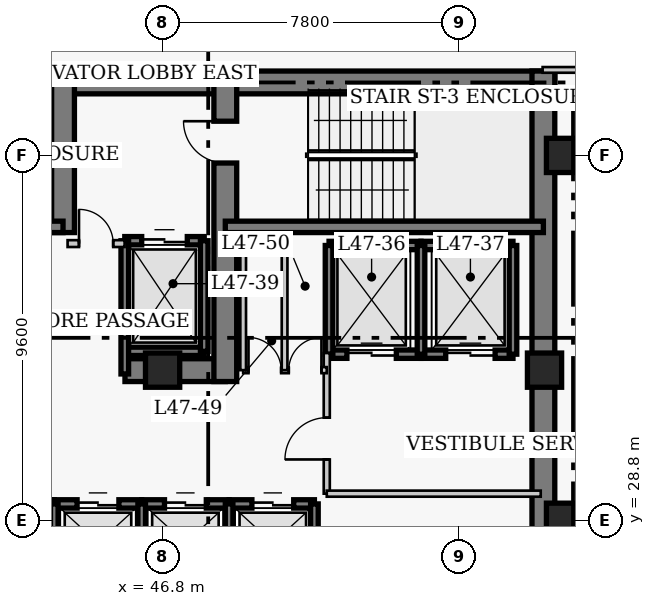
"""IFC4 building model, lengths in metres.
Left out: names, types, materials, properties, quantities, classifications, styles, units other than length and angle.
Written with IfcOpenShell. Run it as: python <this file> out.ifc"""

import sys

from ifc_helpers import new_model, si_unit, direction, frame, frame_2d, origin, origin_2d, place, context, subcontext, project, spatial, rectangle, extrude, element, fill, save


model = new_model("IFC4")
c1 = context("Model", 3, precision=1e-05, world=origin(), true_north=direction((0.0, 1.0)))
c2 = subcontext(c1, "Body", "Model", "MODEL_VIEW")
j1 = project(units=[si_unit("LENGTHUNIT", "METRE"), si_unit("PLANEANGLEUNIT", "RADIAN")], contexts=[c1])
p1 = place(None, origin())
s1 = spatial("IfcSite", under=j1, at=p1, CompositionType="ELEMENT")
p2 = place(p1, origin())
s2 = spatial("IfcBuilding", under=s1, at=p2, CompositionType="ELEMENT")
p3 = place(p2, frame((0.0, 0.0, 189.0)))
s3 = spatial("IfcBuildingStorey", under=s2, at=p3, CompositionType="ELEMENT", Elevation=189.0)
p4 = place(p3, frame((35.85, 40.32, 0.0), z_axis=(0.0, 0.0, 1.0), x_axis=(1.0, 0.0, 0.0)))
e1 = element("IfcWall", 1, at=p4, inside=s3, PredefinedType="SHEAR", context=c2, shape_type="SweptSolid", body=[
    extrude(rectangle(XDim=12.6, YDim=0.6, at=frame_2d((6.3, 0.0))), origin(), (0.0, 0.0, 1.0), 3.9),
])
p5 = place(p3, frame((48.45, 40.32, 0.0), z_axis=(0.0, 0.0, 1.0), x_axis=(1.0, 0.0, 0.0)))
e2 = element("IfcWall", 2, at=p5, inside=s3, PredefinedType="SHEAR", context=c2, shape_type="SweptSolid", body=[
    extrude(rectangle(XDim=8.67, YDim=0.6, at=frame_2d((4.335, 0.0))), origin(), (0.0, 0.0, 1.0), 3.9),
])
p6 = place(p3, frame((56.82, 27.05, 0.0), z_axis=(0.0, 0.0, 1.0), x_axis=(0.0, 1.0, 0.0)))
e3 = element("IfcWall", 3, at=p6, inside=s3, PredefinedType="SHEAR", context=c2, shape_type="SweptSolid", body=[
    extrude(rectangle(XDim=13.57, YDim=0.6, at=frame_2d((6.785, 0.0))), origin(), (0.0, 0.0, 1.0), 3.9),
])
p7 = place(p3, frame((45.81, 32.75, 0.0), z_axis=(0.0, 0.0, 1.0), x_axis=(1.0, 0.0, 0.0)))
e4 = element("IfcWall", 4, at=p7, inside=s3, PredefinedType="SHEAR", context=c2, shape_type="SweptSolid", body=[
    extrude(rectangle(XDim=2.64, YDim=0.6, at=frame_2d((1.32, 0.0))), origin(), (0.0, 0.0, 1.0), 3.9),
])
p8 = place(p3, frame((44.18, 36.37, 0.0), z_axis=(0.0, 0.0, 1.0), x_axis=(0.0, 1.0, 0.0)))
e5 = element("IfcWall", 5, at=p8, inside=s3, PredefinedType="SHEAR", context=c2, shape_type="SweptSolid", body=[
    extrude(rectangle(XDim=3.95, YDim=0.6, at=frame_2d((1.975, 0.0))), origin(), (0.0, 0.0, 1.0), 3.9),
])
p9 = place(p3, frame((48.45, 32.45, 0.0), z_axis=(0.0, 0.0, 1.0), x_axis=(0.0, 1.0, 0.0)))
e6 = element("IfcWall", 6, at=p9, inside=s3, PredefinedType="SHEAR", context=c2, shape_type="SweptSolid", body=[
    extrude(rectangle(XDim=7.87, YDim=0.6, at=frame_2d((3.935, 0.0))), origin(), (0.0, 0.0, 1.0), 3.9),
])
p10 = place(p9, frame((5.75, 0.0, 0.0)))
e7 = element("IfcOpeningElement", 7, at=p10, cuts=e6, PredefinedType="OPENING", context=c2, shape_type="SweptSolid", body=[
    extrude(rectangle(XDim=1.1, YDim=2.15, at=frame_2d((0.55, 1.075))), frame((0.0, 0.31, 0.0), z_axis=(0.0, -1.0, 0.0), x_axis=(1.0, 0.0, 0.0)), (0.0, 0.0, 1.0), 0.62),
])
p11 = place(p3, frame((35.85, 36.52, 0.0), z_axis=(0.0, 0.0, 1.0), x_axis=(1.0, 0.0, 0.0)))
e8 = element("IfcWall", 8, at=p11, inside=s3, PredefinedType="SHEAR", context=c2, shape_type="SweptSolid", body=[
    extrude(rectangle(XDim=8.33, YDim=0.3, at=frame_2d((4.165, 0.0))), origin(), (0.0, 0.0, 1.0), 3.9),
])
p12 = place(p3, frame((48.45, 36.52, 0.0), z_axis=(0.0, 0.0, 1.0), x_axis=(1.0, 0.0, 0.0)))
e9 = element("IfcWall", 9, at=p12, inside=s3, PredefinedType="SHEAR", context=c2, shape_type="SweptSolid", body=[
    extrude(rectangle(XDim=8.37, YDim=0.3, at=frame_2d((4.185, 0.0))), origin(), (0.0, 0.0, 1.0), 3.9),
])
for number, where, z_axis, x_axis in (
    (10, (57.35, 28.8, 0.0), (0.0, 0.0, 1.0), (1.0, 0.0, 0.0)),
    (11, (57.35, 38.4, 0.0), (0.0, 0.0, 1.0), (1.0, 0.0, 0.0)),
    (12, (46.8, 32.75, 0.0), (0.0, 0.0, 1.0), (1.0, 0.0, 0.0)),
    (13, (56.85, 32.75, 0.0), (0.0, 0.0, 1.0), (1.0, 0.0, 0.0)),
):
    element("IfcColumn", number, at=place(p3, frame(where, z_axis=z_axis, x_axis=x_axis)), inside=s3, PredefinedType="COLUMN", context=c2, shape_type="SweptSolid", body=[
        extrude(rectangle(XDim=0.9, YDim=0.9, at=origin_2d()), origin(), (0.0, 0.0, 1.0), 3.9),
    ])
p13 = place(p3, frame((41.705, 29.23, 0.0), z_axis=(0.0, 0.0, 1.0), x_axis=(1.0, 0.0, 0.0)))
e14 = element("IfcWall", 14, at=p13, inside=s3, PredefinedType="SHEAR", context=c2, shape_type="SweptSolid", body=[
    extrude(rectangle(XDim=2.245, YDim=0.22, at=frame_2d((1.123, 0.0))), origin(), (0.0, 0.0, 1.0), 3.9),
])
p14 = place(p13, frame((0.545, 0.0, 0.0)))
e15 = element("IfcOpeningElement", 15, at=p14, cuts=e14, PredefinedType="OPENING", context=c2, shape_type="SweptSolid", body=[
    extrude(rectangle(XDim=1.1, YDim=2.15, at=frame_2d((0.55, 1.075))), frame((0.0, 0.12, 0.0), z_axis=(0.0, -1.0, 0.0), x_axis=(1.0, 0.0, 0.0)), (0.0, 0.0, 1.0), 0.24),
])
p15 = place(p3, frame((43.95, 29.23, 0.0), z_axis=(0.0, 0.0, 1.0), x_axis=(1.0, 0.0, 0.0)))
e16 = element("IfcWall", 16, at=p15, inside=s3, PredefinedType="SHEAR", context=c2, shape_type="SweptSolid", body=[
    extrude(rectangle(XDim=2.3, YDim=0.22, at=frame_2d((1.15, 0.0))), origin(), (0.0, 0.0, 1.0), 3.9),
])
p16 = place(p15, frame((0.6, 0.0, 0.0)))
e17 = element("IfcOpeningElement", 17, at=p16, cuts=e16, PredefinedType="OPENING", context=c2, shape_type="SweptSolid", body=[
    extrude(rectangle(XDim=1.1, YDim=2.15, at=frame_2d((0.55, 1.075))), frame((0.0, 0.12, 0.0), z_axis=(0.0, -1.0, 0.0), x_axis=(1.0, 0.0, 0.0)), (0.0, 0.0, 1.0), 0.24),
])
p17 = place(p3, frame((43.95, 27.17, 0.0), z_axis=(0.0, 0.0, 1.0), x_axis=(0.0, 1.0, 0.0)))
e18 = element("IfcWall", 18, at=p17, inside=s3, PredefinedType="SHEAR", context=c2, shape_type="SweptSolid", body=[
    extrude(rectangle(XDim=2.06, YDim=0.2, at=frame_2d((1.03, 0.0))), origin(), (0.0, 0.0, 1.0), 3.9),
])
p18 = place(p3, frame((46.25, 29.23, 0.0), z_axis=(0.0, 0.0, 1.0), x_axis=(1.0, 0.0, 0.0)))
e19 = element("IfcWall", 19, at=p18, inside=s3, PredefinedType="SHEAR", context=c2, shape_type="SweptSolid", body=[
    extrude(rectangle(XDim=2.3, YDim=0.22, at=frame_2d((1.15, 0.0))), origin(), (0.0, 0.0, 1.0), 3.9),
])
p19 = place(p18, frame((0.6, 0.0, 0.0)))
e20 = element("IfcOpeningElement", 20, at=p19, cuts=e19, PredefinedType="OPENING", context=c2, shape_type="SweptSolid", body=[
    extrude(rectangle(XDim=1.1, YDim=2.15, at=frame_2d((0.55, 1.075))), frame((0.0, 0.12, 0.0), z_axis=(0.0, -1.0, 0.0), x_axis=(1.0, 0.0, 0.0)), (0.0, 0.0, 1.0), 0.24),
])
p20 = place(p3, frame((46.25, 27.17, 0.0), z_axis=(0.0, 0.0, 1.0), x_axis=(0.0, 1.0, 0.0)))
e21 = element("IfcWall", 21, at=p20, inside=s3, PredefinedType="SHEAR", context=c2, shape_type="SweptSolid", body=[
    extrude(rectangle(XDim=2.06, YDim=0.2, at=frame_2d((1.03, 0.0))), origin(), (0.0, 0.0, 1.0), 3.9),
])
p21 = place(p3, frame((48.55, 29.23, 0.0), z_axis=(0.0, 0.0, 1.0), x_axis=(1.0, 0.0, 0.0)))
e22 = element("IfcWall", 22, at=p21, inside=s3, PredefinedType="SHEAR", context=c2, shape_type="SweptSolid", body=[
    extrude(rectangle(XDim=2.245, YDim=0.22, at=frame_2d((1.123, 0.0))), origin(), (0.0, 0.0, 1.0), 3.9),
])
p22 = place(p21, frame((0.6, 0.0, 0.0)))
e23 = element("IfcOpeningElement", 23, at=p22, cuts=e22, PredefinedType="OPENING", context=c2, shape_type="SweptSolid", body=[
    extrude(rectangle(XDim=1.1, YDim=2.15, at=frame_2d((0.55, 1.075))), frame((0.0, 0.12, 0.0), z_axis=(0.0, -1.0, 0.0), x_axis=(1.0, 0.0, 0.0)), (0.0, 0.0, 1.0), 0.24),
])
for number, where, z_axis, x_axis in (
    (24, (48.55, 27.17, 0.0), (0.0, 0.0, 1.0), (0.0, 1.0, 0.0)),
    (25, (50.795, 27.17, 0.0), (0.0, 0.0, 1.0), (0.0, 1.0, 0.0)),
):
    element("IfcWall", number, at=place(p3, frame(where, z_axis=z_axis, x_axis=x_axis)), inside=s3, PredefinedType="SHEAR", context=c2, shape_type="SweptSolid", body=[
        extrude(rectangle(XDim=2.06, YDim=0.2, at=frame_2d((1.03, 0.0))), origin(), (0.0, 0.0, 1.0), 3.9),
    ])
p23 = place(p3, frame((51.18, 36.03, 0.0), z_axis=(0.0, 0.0, 1.0), x_axis=(1.0, 0.0, 0.0)))
e26 = element("IfcWall", 26, at=p23, inside=s3, PredefinedType="SHEAR", context=c2, shape_type="SweptSolid", body=[
    extrude(rectangle(XDim=2.42, YDim=0.22, at=frame_2d((1.21, 0.0))), origin(), (0.0, 0.0, 1.0), 3.9),
])
p24 = place(p3, frame((51.18, 33.17, 0.0), z_axis=(0.0, 0.0, 1.0), x_axis=(1.0, 0.0, 0.0)))
e27 = element("IfcWall", 27, at=p24, inside=s3, PredefinedType="SHEAR", context=c2, shape_type="SweptSolid", body=[
    extrude(rectangle(XDim=2.42, YDim=0.22, at=frame_2d((1.21, 0.0))), origin(), (0.0, 0.0, 1.0), 3.9),
])
p25 = place(p24, frame((0.47, 0.0, 0.0)))
e28 = element("IfcOpeningElement", 28, at=p25, cuts=e27, PredefinedType="OPENING", context=c2, shape_type="SweptSolid", body=[
    extrude(rectangle(XDim=1.3, YDim=2.15, at=frame_2d((0.65, 1.075))), frame((0.0, 0.12, 0.0), z_axis=(0.0, -1.0, 0.0), x_axis=(1.0, 0.0, 0.0)), (0.0, 0.0, 1.0), 0.24),
])
p26 = place(p3, frame((51.18, 33.17, 0.0), z_axis=(0.0, 0.0, 1.0), x_axis=(0.0, 1.0, 0.0)))
e29 = element("IfcWall", 29, at=p26, inside=s3, PredefinedType="SHEAR", context=c2, shape_type="SweptSolid", body=[
    extrude(rectangle(XDim=2.86, YDim=0.2, at=frame_2d((1.43, 0.0))), origin(), (0.0, 0.0, 1.0), 3.9),
])
p27 = place(p3, frame((53.6, 36.03, 0.0), z_axis=(0.0, 0.0, 1.0), x_axis=(1.0, 0.0, 0.0)))
e30 = element("IfcWall", 30, at=p27, inside=s3, PredefinedType="SHEAR", context=c2, shape_type="SweptSolid", body=[
    extrude(rectangle(XDim=2.42, YDim=0.22, at=frame_2d((1.21, 0.0))), origin(), (0.0, 0.0, 1.0), 3.9),
])
p28 = place(p3, frame((53.6, 33.17, 0.0), z_axis=(0.0, 0.0, 1.0), x_axis=(1.0, 0.0, 0.0)))
e31 = element("IfcWall", 31, at=p28, inside=s3, PredefinedType="SHEAR", context=c2, shape_type="SweptSolid", body=[
    extrude(rectangle(XDim=2.42, YDim=0.22, at=frame_2d((1.21, 0.0))), origin(), (0.0, 0.0, 1.0), 3.9),
])
p29 = place(p28, frame((0.65, 0.0, 0.0)))
e32 = element("IfcOpeningElement", 32, at=p29, cuts=e31, PredefinedType="OPENING", context=c2, shape_type="SweptSolid", body=[
    extrude(rectangle(XDim=1.3, YDim=2.15, at=frame_2d((0.65, 1.075))), frame((0.0, 0.12, 0.0), z_axis=(0.0, -1.0, 0.0), x_axis=(1.0, 0.0, 0.0)), (0.0, 0.0, 1.0), 0.24),
])
for number, where, z_axis, x_axis in (
    (33, (53.6, 33.17, 0.0), (0.0, 0.0, 1.0), (0.0, 1.0, 0.0)),
    (34, (56.02, 33.17, 0.0), (0.0, 0.0, 1.0), (0.0, 1.0, 0.0)),
):
    element("IfcWall", number, at=place(p3, frame(where, z_axis=z_axis, x_axis=x_axis)), inside=s3, PredefinedType="SHEAR", context=c2, shape_type="SweptSolid", body=[
        extrude(rectangle(XDim=2.86, YDim=0.2, at=frame_2d((1.43, 0.0))), origin(), (0.0, 0.0, 1.0), 3.9),
    ])
p30 = place(p3, frame((45.805, 36.155, 0.0), z_axis=(0.0, 0.0, 1.0), x_axis=(1.0, 0.0, 0.0)))
e35 = element("IfcWall", 35, at=p30, inside=s3, PredefinedType="SHEAR", context=c2, shape_type="SweptSolid", body=[
    extrude(rectangle(XDim=2.09, YDim=0.22, at=frame_2d((1.045, 0.0))), origin(), (0.0, 0.0, 1.0), 3.9),
])
p31 = place(p30, frame((0.445, 0.0, 0.0)))
e36 = element("IfcOpeningElement", 36, at=p31, cuts=e35, PredefinedType="OPENING", context=c2, shape_type="SweptSolid", body=[
    extrude(rectangle(XDim=1.2, YDim=2.15, at=frame_2d((0.6, 1.075))), frame((0.0, 0.12, 0.0), z_axis=(0.0, -1.0, 0.0), x_axis=(1.0, 0.0, 0.0)), (0.0, 0.0, 1.0), 0.24),
])
p32 = place(p3, frame((45.805, 33.245, 0.0), z_axis=(0.0, 0.0, 1.0), x_axis=(1.0, 0.0, 0.0)))
e37 = element("IfcWall", 37, at=p32, inside=s3, PredefinedType="SHEAR", context=c2, shape_type="SweptSolid", body=[
    extrude(rectangle(XDim=2.09, YDim=0.22, at=frame_2d((1.045, 0.0))), origin(), (0.0, 0.0, 1.0), 3.9),
])
p33 = place(p3, frame((45.805, 32.65, 0.0), z_axis=(0.0, 0.0, 1.0), x_axis=(0.0, 1.0, 0.0)))
e38 = element("IfcWall", 38, at=p33, inside=s3, PredefinedType="SHEAR", context=c2, shape_type="SweptSolid", body=[
    extrude(rectangle(XDim=3.505, YDim=0.2, at=frame_2d((1.752, 0.0))), origin(), (0.0, 0.0, 1.0), 3.9),
])
p34 = place(p3, frame((47.895, 33.245, 0.0), z_axis=(0.0, 0.0, 1.0), x_axis=(0.0, 1.0, 0.0)))
e39 = element("IfcWall", 39, at=p34, inside=s3, PredefinedType="SHEAR", context=c2, shape_type="SweptSolid", body=[
    extrude(rectangle(XDim=2.91, YDim=0.2, at=frame_2d((1.455, 0.0))), origin(), (0.0, 0.0, 1.0), 3.9),
])
p35 = place(p3, frame((44.3, 36.08, 0.0), z_axis=(0.0, 0.0, 1.0), x_axis=(1.0, 0.0, 0.0)))
e40 = element("IfcWall", 40, at=p35, inside=s3, PredefinedType="PARTITIONING", context=c2, shape_type="SweptSolid", body=[
    extrude(rectangle(XDim=1.5, YDim=0.18, at=frame_2d((0.75, 0.0))), origin(), (0.0, 0.0, 1.0), 3.65),
])
p36 = place(p35, frame((0.3, 0.0, 0.0)))
e41 = element("IfcOpeningElement", 41, at=p36, cuts=e40, PredefinedType="OPENING", context=c2, shape_type="SweptSolid", body=[
    extrude(rectangle(XDim=0.9, YDim=2.15, at=frame_2d((0.45, 1.075))), frame((0.0, 0.1, 0.0), z_axis=(0.0, -1.0, 0.0), x_axis=(1.0, 0.0, 0.0)), (0.0, 0.0, 1.0), 0.2),
])
p37 = place(p3, frame((51.12, 29.5, 0.0), z_axis=(0.0, 0.0, 1.0), x_axis=(0.0, 1.0, 0.0)))
e42 = element("IfcWall", 42, at=p37, inside=s3, PredefinedType="PARTITIONING", context=c2, shape_type="SweptSolid", body=[
    extrude(rectangle(XDim=3.7, YDim=0.16, at=frame_2d((1.85, 0.0))), origin(), (0.0, 0.0, 1.0), 3.65),
])
p38 = place(p37, frame((0.9, 0.0, 0.0)))
e43 = element("IfcOpeningElement", 43, at=p38, cuts=e42, PredefinedType="OPENING", context=c2, shape_type="SweptSolid", body=[
    extrude(rectangle(XDim=1.1, YDim=2.15, at=frame_2d((0.55, 1.075))), frame((0.0, 0.09, 0.0), z_axis=(0.0, -1.0, 0.0), x_axis=(1.0, 0.0, 0.0)), (0.0, 0.0, 1.0), 0.18),
])
p39 = place(p3, frame((51.12, 29.5, 0.0), z_axis=(0.0, 0.0, 1.0), x_axis=(1.0, 0.0, 0.0)))
e44 = element("IfcWall", 44, at=p39, inside=s3, PredefinedType="PARTITIONING", context=c2, shape_type="SweptSolid", body=[
    extrude(rectangle(XDim=5.63, YDim=0.16, at=frame_2d((2.815, 0.0))), origin(), (0.0, 0.0, 1.0), 3.65),
])
p40 = place(p3, frame((48.92, 32.75, 0.0), z_axis=(0.0, 0.0, 1.0), x_axis=(1.0, 0.0, 0.0)))
e45 = element("IfcWall", 45, at=p40, inside=s3, PredefinedType="PARTITIONING", context=c2, shape_type="SweptSolid", body=[
    extrude(rectangle(XDim=2.2, YDim=0.16, at=frame_2d((1.1, 0.0))), origin(), (0.0, 0.0, 1.0), 3.65),
])
p41 = place(p40, frame((0.14, 0.0, 0.0)))
e46 = element("IfcOpeningElement", 46, at=p41, cuts=e45, PredefinedType="OPENING", context=c2, shape_type="SweptSolid", body=[
    extrude(rectangle(XDim=0.86, YDim=2.05, at=frame_2d((0.43, 1.025))), frame((0.0, 0.09, 0.0), z_axis=(0.0, -1.0, 0.0), x_axis=(1.0, 0.0, 0.0)), (0.0, 0.0, 1.0), 0.18),
])
p42 = place(p40, frame((1.2, 0.0, 0.0)))
e47 = element("IfcOpeningElement", 47, at=p42, cuts=e45, PredefinedType="OPENING", context=c2, shape_type="SweptSolid", body=[
    extrude(rectangle(XDim=0.86, YDim=2.05, at=frame_2d((0.43, 1.025))), frame((0.0, 0.09, 0.0), z_axis=(0.0, -1.0, 0.0), x_axis=(1.0, 0.0, 0.0)), (0.0, 0.0, 1.0), 0.18),
])
for number, where, z_axis, x_axis in (
    (48, (48.92, 32.75, 0.0), (0.0, 0.0, 1.0), (0.0, 1.0, 0.0)),
    (49, (50.01, 32.75, 0.0), (0.0, 0.0, 1.0), (0.0, 1.0, 0.0)),
):
    element("IfcWall", number, at=place(p3, frame(where, z_axis=z_axis, x_axis=x_axis)), inside=s3, PredefinedType="PARTITIONING", context=c2, shape_type="SweptSolid", body=[
        extrude(rectangle(XDim=3.62, YDim=0.15, at=frame_2d((1.81, 0.0))), origin(), (0.0, 0.0, 1.0), 3.65),
    ])
p43 = place(p3, frame((56.8, 40.65, 0.0), z_axis=(0.0, 0.0, 1.0), x_axis=(1.0, 0.0, 0.0)))
e50 = element("IfcWall", 50, at=p43, inside=s3, PredefinedType="PARTITIONING", context=c2, shape_type="SweptSolid", body=[
    extrude(rectangle(XDim=4.56, YDim=0.15, at=frame_2d((2.28, 0.0))), origin(), (0.0, 0.0, 1.0), 3.65),
])
p44 = place(p43, frame((2.95, 0.0, 0.0)))
e51 = element("IfcOpeningElement", 51, at=p44, cuts=e50, PredefinedType="OPENING", context=c2, shape_type="SweptSolid", body=[
    extrude(rectangle(XDim=1.0, YDim=2.15, at=frame_2d((0.5, 1.075))), frame((0.0, 0.085, 0.0), z_axis=(0.0, -1.0, 0.0), x_axis=(1.0, 0.0, 0.0)), (0.0, 0.0, 1.0), 0.17),
])
p45 = place(p16, origin())
e52 = element("IfcDoor", 52, at=p45, inside=s3, OperationType="DOUBLE_DOOR_SLIDING", PredefinedType="DOOR", context=c2, shape_type="SweptSolid", body=[
    extrude(rectangle(XDim=1.1, YDim=2.15, at=frame_2d((0.55, 1.075))), frame((0.0, 0.025, 0.0), z_axis=(0.0, -1.0, 0.0), x_axis=(1.0, 0.0, 0.0)), (0.0, 0.0, 1.0), 0.05),
])
fill(e17, e52)
p46 = place(p19, origin())
e53 = element("IfcDoor", 53, at=p46, inside=s3, OperationType="DOUBLE_DOOR_SLIDING", PredefinedType="DOOR", context=c2, shape_type="SweptSolid", body=[
    extrude(rectangle(XDim=1.1, YDim=2.15, at=frame_2d((0.55, 1.075))), frame((0.0, 0.025, 0.0), z_axis=(0.0, -1.0, 0.0), x_axis=(1.0, 0.0, 0.0)), (0.0, 0.0, 1.0), 0.05),
])
fill(e20, e53)
p47 = place(p22, origin())
e54 = element("IfcDoor", 54, at=p47, inside=s3, OperationType="DOUBLE_DOOR_SLIDING", PredefinedType="DOOR", context=c2, shape_type="SweptSolid", body=[
    extrude(rectangle(XDim=1.1, YDim=2.15, at=frame_2d((0.55, 1.075))), frame((0.0, 0.025, 0.0), z_axis=(0.0, -1.0, 0.0), x_axis=(1.0, 0.0, 0.0)), (0.0, 0.0, 1.0), 0.05),
])
fill(e23, e54)
p48 = place(p25, origin())
e55 = element("IfcDoor", 55, at=p48, inside=s3, OperationType="DOUBLE_DOOR_SLIDING", PredefinedType="DOOR", context=c2, shape_type="SweptSolid", body=[
    extrude(rectangle(XDim=1.3, YDim=2.15, at=frame_2d((0.65, 1.075))), frame((0.0, 0.025, 0.0), z_axis=(0.0, -1.0, 0.0), x_axis=(1.0, 0.0, 0.0)), (0.0, 0.0, 1.0), 0.05),
])
fill(e28, e55)
p49 = place(p29, origin())
e56 = element("IfcDoor", 56, at=p49, inside=s3, OperationType="DOUBLE_DOOR_SLIDING", PredefinedType="DOOR", context=c2, shape_type="SweptSolid", body=[
    extrude(rectangle(XDim=1.3, YDim=2.15, at=frame_2d((0.65, 1.075))), frame((0.0, 0.025, 0.0), z_axis=(0.0, -1.0, 0.0), x_axis=(1.0, 0.0, 0.0)), (0.0, 0.0, 1.0), 0.05),
])
fill(e32, e56)
p50 = place(p31, origin())
e57 = element("IfcDoor", 57, at=p50, inside=s3, OperationType="DOUBLE_DOOR_SLIDING", PredefinedType="DOOR", context=c2, shape_type="SweptSolid", body=[
    extrude(rectangle(XDim=1.2, YDim=2.15, at=frame_2d((0.6, 1.075))), frame((0.0, 0.025, 0.0), z_axis=(0.0, -1.0, 0.0), x_axis=(1.0, 0.0, 0.0)), (0.0, 0.0, 1.0), 0.05),
])
fill(e36, e57)
p51 = place(p36, origin())
e58 = element("IfcDoor", 58, at=p51, inside=s3, OperationType="SINGLE_SWING_LEFT", PredefinedType="DOOR", context=c2, shape_type="SweptSolid", body=[
    extrude(rectangle(XDim=0.9, YDim=2.15, at=frame_2d((0.45, 1.075))), frame((0.0, 0.025, 0.0), z_axis=(0.0, -1.0, 0.0), x_axis=(1.0, 0.0, 0.0)), (0.0, 0.0, 1.0), 0.05),
])
fill(e41, e58)
p52 = place(p38, origin())
e59 = element("IfcDoor", 59, at=p52, inside=s3, OperationType="SINGLE_SWING_LEFT", PredefinedType="DOOR", context=c2, shape_type="SweptSolid", body=[
    extrude(rectangle(XDim=1.1, YDim=2.15, at=frame_2d((0.55, 1.075))), frame((0.0, 0.025, 0.0), z_axis=(0.0, -1.0, 0.0), x_axis=(1.0, 0.0, 0.0)), (0.0, 0.0, 1.0), 0.05),
])
fill(e43, e59)
p53 = place(p41, origin())
e60 = element("IfcDoor", 60, at=p53, inside=s3, OperationType="SINGLE_SWING_LEFT", PredefinedType="DOOR", context=c2, shape_type="SweptSolid", body=[
    extrude(rectangle(XDim=0.86, YDim=2.05, at=frame_2d((0.43, 1.025))), frame((0.0, 0.025, 0.0), z_axis=(0.0, -1.0, 0.0), x_axis=(1.0, 0.0, 0.0)), (0.0, 0.0, 1.0), 0.05),
])
fill(e46, e60)
p54 = place(p42, origin())
e61 = element("IfcDoor", 61, at=p54, inside=s3, OperationType="SINGLE_SWING_RIGHT", PredefinedType="DOOR", context=c2, shape_type="SweptSolid", body=[
    extrude(rectangle(XDim=0.86, YDim=2.05, at=frame_2d((0.43, 1.025))), frame((0.0, 0.025, 0.0), z_axis=(0.0, -1.0, 0.0), x_axis=(1.0, 0.0, 0.0)), (0.0, 0.0, 1.0), 0.05),
])
fill(e47, e61)
p55 = place(p10, origin())
e62 = element("IfcDoor", 62, at=p55, inside=s3, OperationType="SINGLE_SWING_RIGHT", PredefinedType="DOOR", context=c2, shape_type="SweptSolid", body=[
    extrude(rectangle(XDim=1.1, YDim=2.15, at=frame_2d((0.55, 1.075))), frame((0.0, 0.025, 0.0), z_axis=(0.0, -1.0, 0.0), x_axis=(1.0, 0.0, 0.0)), (0.0, 0.0, 1.0), 0.05),
])
fill(e7, e62)
save(model, sys.argv[1])
